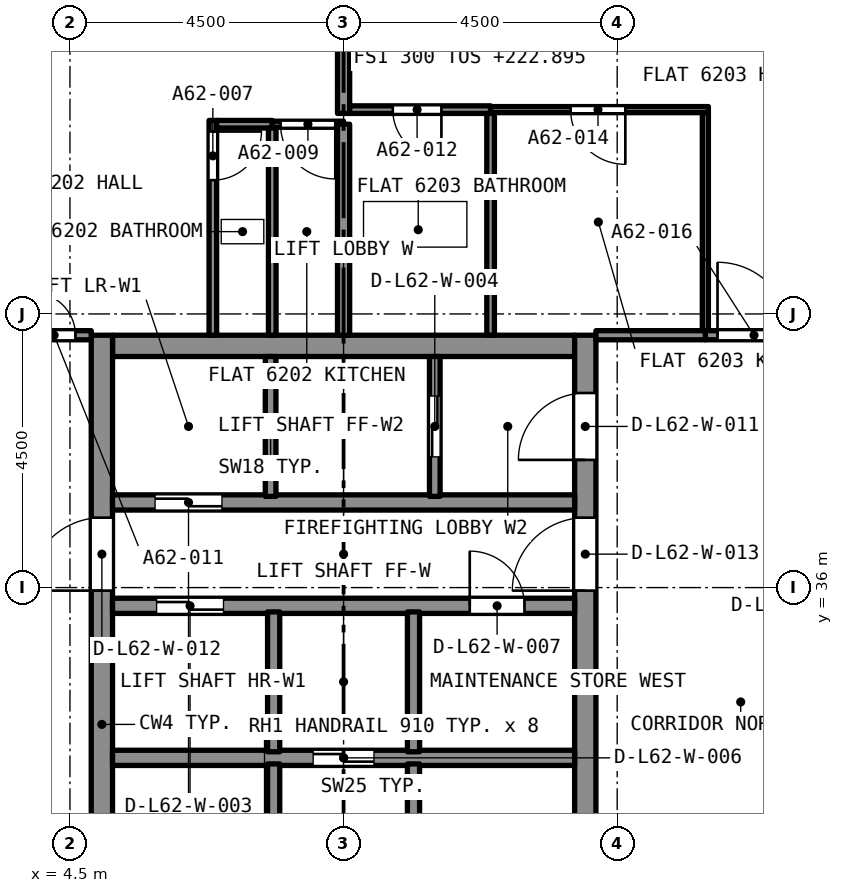
"""IFC4 building model, lengths in metres.
Left out: names, types, materials, properties, quantities, classifications, styles, units other than length and angle.
Written with IfcOpenShell. Run it as: python <this file> out.ifc"""

import sys

from ifc_helpers import new_model, si_unit, direction, frame, frame_2d, origin, place, context, subcontext, project, spatial, rectangle, extrude, element, fill, save


model = new_model("IFC4")
c1 = context("Model", 3, precision=1e-05, world=origin(), true_north=direction((0.0, 1.0)))
c2 = subcontext(c1, "Body", "Model", "MODEL_VIEW")
j1 = project(units=[si_unit("LENGTHUNIT", "METRE"), si_unit("PLANEANGLEUNIT", "RADIAN")], contexts=[c1])
p1 = place(None, origin())
s1 = spatial("IfcSite", under=j1, at=p1, CompositionType="ELEMENT")
p2 = place(p1, origin())
s2 = spatial("IfcBuilding", under=s1, at=p2, CompositionType="ELEMENT")
p3 = place(p2, frame((0.0, 0.0, 222.895)))
s3 = spatial("IfcBuildingStorey", under=s2, at=p3, CompositionType="ELEMENT", Elevation=222.895)
p4 = place(p3, frame((5.2, 39.975, 0.0), z_axis=(0.0, 0.0, 1.0), x_axis=(1.0, 0.0, 0.0)))
e1 = element("IfcWall", 1, at=p4, inside=s3, PredefinedType="SOLIDWALL", context=c2, shape_type="SweptSolid", body=[
    extrude(rectangle(XDim=7.6, YDim=0.35, at=frame_2d((3.8, 0.0))), origin(), (0.0, 0.0, 1.0), 3.2),
])
p5 = place(p3, frame((5.025, 27.35, 0.0), z_axis=(0.0, 0.0, 1.0), x_axis=(0.0, 1.0, 0.0)))
e2 = element("IfcWall", 2, at=p5, inside=s3, PredefinedType="SOLIDWALL", context=c2, shape_type="SweptSolid", body=[
    extrude(rectangle(XDim=12.8, YDim=0.35, at=frame_2d((6.4, 0.0))), origin(), (0.0, 0.0, 1.0), 3.2),
])
p6 = place(p5, frame((8.6, 0.0, 0.0)))
e3 = element("IfcOpeningElement", 3, at=p6, cuts=e2, PredefinedType="OPENING", context=c2, shape_type="SweptSolid", body=[
    extrude(rectangle(XDim=1.2, YDim=2.1, at=frame_2d((0.6, 1.05))), frame((0.0, 0.185, 0.0), z_axis=(0.0, -1.0, 0.0), x_axis=(1.0, 0.0, 0.0)), (0.0, 0.0, 1.0), 0.37),
])
p7 = place(p3, frame((12.975, 27.35, 0.0), z_axis=(0.0, 0.0, 1.0), x_axis=(0.0, 1.0, 0.0)))
e4 = element("IfcWall", 4, at=p7, inside=s3, PredefinedType="SOLIDWALL", context=c2, shape_type="SweptSolid", body=[
    extrude(rectangle(XDim=12.8, YDim=0.35, at=frame_2d((6.4, 0.0))), origin(), (0.0, 0.0, 1.0), 3.2),
])
p8 = place(p7, frame((10.75, 0.0, 0.0)))
e5 = element("IfcOpeningElement", 5, at=p8, cuts=e4, PredefinedType="OPENING", context=c2, shape_type="SweptSolid", body=[
    extrude(rectangle(XDim=1.1, YDim=2.1, at=frame_2d((0.55, 1.05))), frame((0.0, 0.185, 0.0), z_axis=(0.0, -1.0, 0.0), x_axis=(1.0, 0.0, 0.0)), (0.0, 0.0, 1.0), 0.37),
])
p9 = place(p7, frame((8.6, 0.0, 0.0)))
e6 = element("IfcOpeningElement", 6, at=p9, cuts=e4, PredefinedType="OPENING", context=c2, shape_type="SweptSolid", body=[
    extrude(rectangle(XDim=1.2, YDim=2.1, at=frame_2d((0.6, 1.05))), frame((0.0, 0.185, 0.0), z_axis=(0.0, -1.0, 0.0), x_axis=(1.0, 0.0, 0.0)), (0.0, 0.0, 1.0), 0.37),
])
p10 = place(p3, frame((6.85, 43.683, 0.0), z_axis=(0.0, 0.0, 1.0), x_axis=(0.0, -1.0, 0.0)))
e7 = element("IfcWall", 7, at=p10, inside=s3, PredefinedType="PARTITIONING", context=c2, shape_type="SweptSolid", body=[
    extrude(rectangle(XDim=3.533, YDim=0.125, at=frame_2d((1.766, 0.0))), origin(), (0.0, 0.0, 1.0), 2.9),
])
p11 = place(p10, frame((0.183, 0.0, 0.0)))
e8 = element("IfcOpeningElement", 8, at=p11, cuts=e7, PredefinedType="OPENING", context=c2, shape_type="SweptSolid", body=[
    extrude(rectangle(XDim=0.8, YDim=2.1, at=frame_2d((0.4, 1.05))), frame((0.0, 0.073, 0.0), z_axis=(0.0, -1.0, 0.0), x_axis=(1.0, 0.0, 0.0)), (0.0, 0.0, 1.0), 0.145),
])
p12 = place(p3, frame((6.913, 43.62, 0.0), z_axis=(0.0, 0.0, 1.0), x_axis=(1.0, 0.0, 0.0)))
e9 = element("IfcWall", 9, at=p12, inside=s3, PredefinedType="PARTITIONING", context=c2, shape_type="SweptSolid", body=[
    extrude(rectangle(XDim=0.915, YDim=0.125, at=frame_2d((0.458, 0.0))), origin(), (0.0, 0.0, 1.0), 2.9),
])
p13 = place(p3, frame((7.827, 40.15, 0.0), z_axis=(0.0, 0.0, 1.0), x_axis=(0.0, 1.0, 0.0)))
e10 = element("IfcWall", 10, at=p13, inside=s3, PredefinedType="PARTITIONING", context=c2, shape_type="SweptSolid", body=[
    extrude(rectangle(XDim=3.408, YDim=0.125, at=frame_2d((1.704, 0.0))), origin(), (0.0, 0.0, 1.0), 2.9),
])
p14 = place(p3, frame((9.0, 43.62, 0.0), z_axis=(0.0, 0.0, 1.0), x_axis=(-1.0, 0.0, 0.0)))
e11 = element("IfcWall", 11, at=p14, inside=s3, PredefinedType="PARTITIONING", context=c2, shape_type="SweptSolid", body=[
    extrude(rectangle(XDim=1.173, YDim=0.1, at=frame_2d((0.586, 0.0))), origin(), (0.0, 0.0, 1.0), 2.9),
])
p15 = place(p14, frame((0.136, 0.0, 0.0)))
e12 = element("IfcOpeningElement", 12, at=p15, cuts=e11, PredefinedType="OPENING", context=c2, shape_type="SweptSolid", body=[
    extrude(rectangle(XDim=0.9, YDim=2.1, at=frame_2d((0.45, 1.05))), frame((0.0, 0.06, 0.0), z_axis=(0.0, -1.0, 0.0), x_axis=(1.0, 0.0, 0.0)), (0.0, 0.0, 1.0), 0.12),
])
p16 = place(p3, frame((9.0, 43.798, 0.0), z_axis=(0.0, 0.0, 1.0), x_axis=(0.0, 1.0, 0.0)))
e13 = element("IfcWall", 13, at=p16, inside=s3, PredefinedType="PARTITIONING", context=c2, shape_type="SweptSolid", body=[
    extrude(rectangle(XDim=5.302, YDim=0.2, at=frame_2d((2.651, 0.0))), origin(), (0.0, 0.0, 1.0), 2.9),
])
p17 = place(p3, frame((3.65, 40.15, 0.0), z_axis=(0.0, 0.0, 1.0), x_axis=(1.0, 0.0, 0.0)))
e14 = element("IfcWall", 14, at=p17, inside=s3, PredefinedType="PARTITIONING", context=c2, shape_type="SweptSolid", body=[
    extrude(rectangle(XDim=1.2, YDim=0.15, at=frame_2d((0.6, 0.0))), origin(), (0.0, 0.0, 1.0), 2.9),
])
p18 = place(p17, frame((0.24, 0.0, 0.0)))
e15 = element("IfcOpeningElement", 15, at=p18, cuts=e14, PredefinedType="OPENING", context=c2, shape_type="SweptSolid", body=[
    extrude(rectangle(XDim=0.7, YDim=2.1, at=frame_2d((0.35, 1.05))), frame((0.0, 0.085, 0.0), z_axis=(0.0, -1.0, 0.0), x_axis=(1.0, 0.0, 0.0)), (0.0, 0.0, 1.0), 0.17),
])
p19 = place(p3, frame((9.0, 40.15, 0.0), z_axis=(0.0, 0.0, 1.0), x_axis=(0.0, 1.0, 0.0)))
e16 = element("IfcWall", 16, at=p19, inside=s3, PredefinedType="PARTITIONING", context=c2, shape_type="SweptSolid", body=[
    extrude(rectangle(XDim=3.47, YDim=0.2, at=frame_2d((1.735, 0.0))), origin(), (0.0, 0.0, 1.0), 2.9),
])
p20 = place(p3, frame((11.418, 43.86, 0.0), z_axis=(0.0, 0.0, 1.0), x_axis=(-1.0, 0.0, 0.0)))
e17 = element("IfcWall", 17, at=p20, inside=s3, PredefinedType="PARTITIONING", context=c2, shape_type="SweptSolid", body=[
    extrude(rectangle(XDim=2.318, YDim=0.125, at=frame_2d((1.159, 0.0))), origin(), (0.0, 0.0, 1.0), 2.9),
])
p21 = place(p20, frame((0.809, 0.0, 0.0)))
e18 = element("IfcOpeningElement", 18, at=p21, cuts=e17, PredefinedType="OPENING", context=c2, shape_type="SweptSolid", body=[
    extrude(rectangle(XDim=0.8, YDim=2.1, at=frame_2d((0.4, 1.05))), frame((0.0, 0.073, 0.0), z_axis=(0.0, -1.0, 0.0), x_axis=(1.0, 0.0, 0.0)), (0.0, 0.0, 1.0), 0.145),
])
p22 = place(p3, frame((11.418, 40.15, 0.0), z_axis=(0.0, 0.0, 1.0), x_axis=(0.0, 1.0, 0.0)))
e19 = element("IfcWall", 19, at=p22, inside=s3, PredefinedType="PARTITIONING", context=c2, shape_type="SweptSolid", body=[
    extrude(rectangle(XDim=3.648, YDim=0.125, at=frame_2d((1.824, 0.0))), origin(), (0.0, 0.0, 1.0), 2.9),
])
p23 = place(p3, frame((14.95, 40.225, 0.0), z_axis=(0.0, 0.0, 1.0), x_axis=(0.0, 1.0, 0.0)))
e20 = element("IfcWall", 20, at=p23, inside=s3, PredefinedType="PARTITIONING", context=c2, shape_type="SweptSolid", body=[
    extrude(rectangle(XDim=3.585, YDim=0.1, at=frame_2d((1.792, 0.0))), origin(), (0.0, 0.0, 1.0), 2.9),
])
p24 = place(p3, frame((15.0, 43.86, 0.0), z_axis=(0.0, 0.0, 1.0), x_axis=(-1.0, 0.0, 0.0)))
e21 = element("IfcWall", 21, at=p24, inside=s3, PredefinedType="PARTITIONING", context=c2, shape_type="SweptSolid", body=[
    extrude(rectangle(XDim=3.582, YDim=0.1, at=frame_2d((1.791, 0.0))), origin(), (0.0, 0.0, 1.0), 2.9),
])
p25 = place(p24, frame((1.366, 0.0, 0.0)))
e22 = element("IfcOpeningElement", 22, at=p25, cuts=e21, PredefinedType="OPENING", context=c2, shape_type="SweptSolid", body=[
    extrude(rectangle(XDim=0.9, YDim=2.1, at=frame_2d((0.45, 1.05))), frame((0.0, 0.06, 0.0), z_axis=(0.0, -1.0, 0.0), x_axis=(1.0, 0.0, 0.0)), (0.0, 0.0, 1.0), 0.12),
])
p26 = place(p3, frame((14.95, 40.15, 0.0), z_axis=(0.0, 0.0, 1.0), x_axis=(1.0, 0.0, 0.0)))
e23 = element("IfcWall", 23, at=p26, inside=s3, PredefinedType="PARTITIONING", context=c2, shape_type="SweptSolid", body=[
    extrude(rectangle(XDim=2.65, YDim=0.15, at=frame_2d((1.325, 0.0))), origin(), (0.0, 0.0, 1.0), 2.9),
])
p27 = place(p26, frame((0.2, 0.0, 0.0)))
e24 = element("IfcOpeningElement", 24, at=p27, cuts=e23, PredefinedType="OPENING", context=c2, shape_type="SweptSolid", body=[
    extrude(rectangle(XDim=1.2, YDim=2.4, at=frame_2d((0.6, 1.2))), frame((0.0, 0.085, 0.0), z_axis=(0.0, -1.0, 0.0), x_axis=(1.0, 0.0, 0.0)), (0.0, 0.0, 1.0), 0.17),
])
p28 = place(p3, frame((13.15, 40.15, 0.0), z_axis=(0.0, 0.0, 1.0), x_axis=(1.0, 0.0, 0.0)))
e25 = element("IfcWall", 25, at=p28, inside=s3, PredefinedType="PARTITIONING", context=c2, shape_type="SweptSolid", body=[
    extrude(rectangle(XDim=1.8, YDim=0.15, at=frame_2d((0.9, 0.0))), origin(), (0.0, 0.0, 1.0), 2.9),
])
p29 = place(p3, frame((5.2, 33.2, 0.0), z_axis=(0.0, 0.0, 1.0), x_axis=(1.0, 0.0, 0.0)))
e26 = element("IfcWall", 26, at=p29, inside=s3, PredefinedType="SOLIDWALL", context=c2, shape_type="SweptSolid", body=[
    extrude(rectangle(XDim=7.6, YDim=0.25, at=frame_2d((3.8, 0.0))), origin(), (0.0, 0.0, 1.0), 2.9),
])
p30 = place(p29, frame((3.3, 0.0, 0.0)))
e27 = element("IfcOpeningElement", 27, at=p30, cuts=e26, PredefinedType="OPENING", context=c2, shape_type="SweptSolid", body=[
    extrude(rectangle(XDim=1.0, YDim=2.1, at=frame_2d((0.5, 1.05))), frame((0.0, 0.135, 0.0), z_axis=(0.0, -1.0, 0.0), x_axis=(1.0, 0.0, 0.0)), (0.0, 0.0, 1.0), 0.27),
])
p31 = place(p3, frame((5.2, 35.7, 0.0), z_axis=(0.0, 0.0, 1.0), x_axis=(1.0, 0.0, 0.0)))
e28 = element("IfcWall", 28, at=p31, inside=s3, PredefinedType="SOLIDWALL", context=c2, shape_type="SweptSolid", body=[
    extrude(rectangle(XDim=7.6, YDim=0.25, at=frame_2d((3.8, 0.0))), origin(), (0.0, 0.0, 1.0), 2.9),
])
p32 = place(p31, frame((0.725, 0.0, 0.0)))
e29 = element("IfcOpeningElement", 29, at=p32, cuts=e28, PredefinedType="OPENING", context=c2, shape_type="SweptSolid", body=[
    extrude(rectangle(XDim=1.1, YDim=2.4, at=frame_2d((0.55, 1.2))), frame((0.0, 0.135, 0.0), z_axis=(0.0, -1.0, 0.0), x_axis=(1.0, 0.0, 0.0)), (0.0, 0.0, 1.0), 0.27),
])
p33 = place(p31, frame((5.875, 0.0, 0.0)))
e30 = element("IfcOpeningElement", 30, at=p33, cuts=e28, PredefinedType="OPENING", context=c2, shape_type="SweptSolid", body=[
    extrude(rectangle(XDim=0.9, YDim=2.1, at=frame_2d((0.45, 1.05))), frame((0.0, 0.135, 0.0), z_axis=(0.0, -1.0, 0.0), x_axis=(1.0, 0.0, 0.0)), (0.0, 0.0, 1.0), 0.27),
])
p34 = place(p3, frame((5.2, 37.4, 0.0), z_axis=(0.0, 0.0, 1.0), x_axis=(1.0, 0.0, 0.0)))
e31 = element("IfcWall", 31, at=p34, inside=s3, PredefinedType="SOLIDWALL", context=c2, shape_type="SweptSolid", body=[
    extrude(rectangle(XDim=7.6, YDim=0.25, at=frame_2d((3.8, 0.0))), origin(), (0.0, 0.0, 1.0), 2.9),
])
p35 = place(p34, frame((0.7, 0.0, 0.0)))
e32 = element("IfcOpeningElement", 32, at=p35, cuts=e31, PredefinedType="OPENING", context=c2, shape_type="SweptSolid", body=[
    extrude(rectangle(XDim=1.1, YDim=2.4, at=frame_2d((0.55, 1.2))), frame((0.0, 0.135, 0.0), z_axis=(0.0, -1.0, 0.0), x_axis=(1.0, 0.0, 0.0)), (0.0, 0.0, 1.0), 0.27),
])
p36 = place(p3, frame((7.85, 27.7, 0.0), z_axis=(0.0, 0.0, 1.0), x_axis=(0.0, 1.0, 0.0)))
e33 = element("IfcWall", 33, at=p36, inside=s3, PredefinedType="SOLIDWALL", context=c2, shape_type="SweptSolid", body=[
    extrude(rectangle(XDim=5.4, YDim=0.2, at=frame_2d((2.7, 0.0))), origin(), (0.0, 0.0, 1.0), 2.9),
])
p37 = place(p36, frame((0.2, 0.0, 0.0)))
e34 = element("IfcOpeningElement", 34, at=p37, cuts=e33, PredefinedType="OPENING", context=c2, shape_type="SweptSolid", body=[
    extrude(rectangle(XDim=0.9, YDim=2.1, at=frame_2d((0.45, 1.05))), frame((0.0, 0.11, 0.0), z_axis=(0.0, -1.0, 0.0), x_axis=(1.0, 0.0, 0.0)), (0.0, 0.0, 1.0), 0.22),
])
p38 = place(p3, frame((10.15, 27.7, 0.0), z_axis=(0.0, 0.0, 1.0), x_axis=(0.0, 1.0, 0.0)))
e35 = element("IfcWall", 35, at=p38, inside=s3, PredefinedType="SOLIDWALL", context=c2, shape_type="SweptSolid", body=[
    extrude(rectangle(XDim=5.4, YDim=0.2, at=frame_2d((2.7, 0.0))), origin(), (0.0, 0.0, 1.0), 2.9),
])
p39 = place(p38, frame((0.2, 0.0, 0.0)))
e36 = element("IfcOpeningElement", 36, at=p39, cuts=e35, PredefinedType="OPENING", context=c2, shape_type="SweptSolid", body=[
    extrude(rectangle(XDim=0.9, YDim=2.1, at=frame_2d((0.45, 1.05))), frame((0.0, 0.11, 0.0), z_axis=(0.0, -1.0, 0.0), x_axis=(1.0, 0.0, 0.0)), (0.0, 0.0, 1.0), 0.22),
])
for number, where, z_axis, x_axis in (
    (37, (7.85, 33.3, 0.0), (0.0, 0.0, 1.0), (0.0, 1.0, 0.0)),
    (38, (10.15, 33.3, 0.0), (0.0, 0.0, 1.0), (0.0, 1.0, 0.0)),
):
    element("IfcWall", number, at=place(p3, frame(where, z_axis=z_axis, x_axis=x_axis)), inside=s3, PredefinedType="SOLIDWALL", context=c2, shape_type="SweptSolid", body=[
        extrude(rectangle(XDim=2.3, YDim=0.2, at=frame_2d((1.15, 0.0))), origin(), (0.0, 0.0, 1.0), 2.9),
    ])
p40 = place(p3, frame((7.8, 37.5, 0.0), z_axis=(0.0, 0.0, 1.0), x_axis=(0.0, 1.0, 0.0)))
e39 = element("IfcWall", 39, at=p40, inside=s3, PredefinedType="SOLIDWALL", context=c2, shape_type="SweptSolid", body=[
    extrude(rectangle(XDim=2.3, YDim=0.175, at=frame_2d((1.15, 0.0))), origin(), (0.0, 0.0, 1.0), 2.9),
])
p41 = place(p3, frame((10.5, 37.5, 0.0), z_axis=(0.0, 0.0, 1.0), x_axis=(0.0, 1.0, 0.0)))
e40 = element("IfcWall", 40, at=p41, inside=s3, PredefinedType="SOLIDWALL", context=c2, shape_type="SweptSolid", body=[
    extrude(rectangle(XDim=2.3, YDim=0.175, at=frame_2d((1.15, 0.0))), origin(), (0.0, 0.0, 1.0), 2.9),
])
p42 = place(p41, frame((0.65, 0.0, 0.0)))
e41 = element("IfcOpeningElement", 41, at=p42, cuts=e40, PredefinedType="OPENING", context=c2, shape_type="SweptSolid", body=[
    extrude(rectangle(XDim=1.0, YDim=2.1, at=frame_2d((0.5, 1.05))), frame((0.0, 0.097, 0.0), z_axis=(0.0, -1.0, 0.0), x_axis=(1.0, 0.0, 0.0)), (0.0, 0.0, 1.0), 0.195),
])
p43 = place(p11, origin())
e42 = element("IfcDoor", 42, at=p43, inside=s3, OperationType="SINGLE_SWING_LEFT", PredefinedType="DOOR", context=c2, shape_type="SweptSolid", body=[
    extrude(rectangle(XDim=0.8, YDim=2.1, at=frame_2d((0.4, 1.05))), frame((0.0, 0.025, 0.0), z_axis=(0.0, -1.0, 0.0), x_axis=(1.0, 0.0, 0.0)), (0.0, 0.0, 1.0), 0.05),
])
fill(e8, e42)
p44 = place(p15, origin())
e43 = element("IfcDoor", 43, at=p44, inside=s3, OperationType="SINGLE_SWING_RIGHT", PredefinedType="DOOR", context=c2, shape_type="SweptSolid", body=[
    extrude(rectangle(XDim=0.9, YDim=2.1, at=frame_2d((0.45, 1.05))), frame((0.0, 0.025, 0.0), z_axis=(0.0, -1.0, 0.0), x_axis=(1.0, 0.0, 0.0)), (0.0, 0.0, 1.0), 0.05),
])
fill(e12, e43)
p45 = place(p18, origin())
e44 = element("IfcDoor", 44, at=p45, inside=s3, OperationType="SINGLE_SWING_LEFT", PredefinedType="DOOR", context=c2, shape_type="SweptSolid", body=[
    extrude(rectangle(XDim=0.7, YDim=2.1, at=frame_2d((0.35, 1.05))), frame((0.0, 0.025, 0.0), z_axis=(0.0, -1.0, 0.0), x_axis=(1.0, 0.0, 0.0)), (0.0, 0.0, 1.0), 0.05),
])
fill(e15, e44)
p46 = place(p21, origin())
e45 = element("IfcDoor", 45, at=p46, inside=s3, OperationType="SINGLE_SWING_RIGHT", PredefinedType="DOOR", context=c2, shape_type="SweptSolid", body=[
    extrude(rectangle(XDim=0.8, YDim=2.1, at=frame_2d((0.4, 1.05))), frame((0.0, 0.025, 0.0), z_axis=(0.0, -1.0, 0.0), x_axis=(1.0, 0.0, 0.0)), (0.0, 0.0, 1.0), 0.05),
])
fill(e18, e45)
p47 = place(p25, origin())
e46 = element("IfcDoor", 46, at=p47, inside=s3, OperationType="SINGLE_SWING_RIGHT", PredefinedType="DOOR", context=c2, shape_type="SweptSolid", body=[
    extrude(rectangle(XDim=0.9, YDim=2.1, at=frame_2d((0.45, 1.05))), frame((0.0, 0.025, 0.0), z_axis=(0.0, -1.0, 0.0), x_axis=(1.0, 0.0, 0.0)), (0.0, 0.0, 1.0), 0.05),
])
fill(e22, e46)
p48 = place(p27, origin())
e47 = element("IfcDoor", 47, at=p48, inside=s3, OperationType="SINGLE_SWING_LEFT", PredefinedType="DOOR", context=c2, shape_type="SweptSolid", body=[
    extrude(rectangle(XDim=1.2, YDim=2.4, at=frame_2d((0.6, 1.2))), frame((0.0, 0.025, 0.0), z_axis=(0.0, -1.0, 0.0), x_axis=(1.0, 0.0, 0.0)), (0.0, 0.0, 1.0), 0.05),
])
fill(e24, e47)
p49 = place(p35, origin())
e48 = element("IfcDoor", 48, at=p49, inside=s3, OperationType="SLIDING_TO_LEFT", PredefinedType="DOOR", context=c2, shape_type="SweptSolid", body=[
    extrude(rectangle(XDim=1.1, YDim=2.4, at=frame_2d((0.55, 1.2))), frame((0.0, 0.025, 0.0), z_axis=(0.0, -1.0, 0.0), x_axis=(1.0, 0.0, 0.0)), (0.0, 0.0, 1.0), 0.05),
])
fill(e32, e48)
p50 = place(p42, origin())
e49 = element("IfcDoor", 49, at=p50, inside=s3, OperationType="SLIDING_TO_LEFT", PredefinedType="DOOR", context=c2, shape_type="SweptSolid", body=[
    extrude(rectangle(XDim=1.0, YDim=2.1, at=frame_2d((0.5, 1.05))), frame((0.0, 0.025, 0.0), z_axis=(0.0, -1.0, 0.0), x_axis=(1.0, 0.0, 0.0)), (0.0, 0.0, 1.0), 0.05),
])
fill(e41, e49)
p51 = place(p32, origin())
e50 = element("IfcDoor", 50, at=p51, inside=s3, OperationType="SLIDING_TO_LEFT", PredefinedType="DOOR", context=c2, shape_type="SweptSolid", body=[
    extrude(rectangle(XDim=1.1, YDim=2.4, at=frame_2d((0.55, 1.2))), frame((0.0, 0.025, 0.0), z_axis=(0.0, -1.0, 0.0), x_axis=(1.0, 0.0, 0.0)), (0.0, 0.0, 1.0), 0.05),
])
fill(e29, e50)
p52 = place(p30, origin())
e51 = element("IfcDoor", 51, at=p52, inside=s3, OperationType="SLIDING_TO_LEFT", PredefinedType="DOOR", context=c2, shape_type="SweptSolid", body=[
    extrude(rectangle(XDim=1.0, YDim=2.1, at=frame_2d((0.5, 1.05))), frame((0.0, 0.025, 0.0), z_axis=(0.0, -1.0, 0.0), x_axis=(1.0, 0.0, 0.0)), (0.0, 0.0, 1.0), 0.05),
])
fill(e27, e51)
p53 = place(p33, origin())
e52 = element("IfcDoor", 52, at=p53, inside=s3, OperationType="SINGLE_SWING_LEFT", PredefinedType="DOOR", context=c2, shape_type="SweptSolid", body=[
    extrude(rectangle(XDim=0.9, YDim=2.1, at=frame_2d((0.45, 1.05))), frame((0.0, 0.025, 0.0), z_axis=(0.0, -1.0, 0.0), x_axis=(1.0, 0.0, 0.0)), (0.0, 0.0, 1.0), 0.05),
])
fill(e30, e52)
p54 = place(p8, origin())
e53 = element("IfcDoor", 53, at=p54, inside=s3, OperationType="SINGLE_SWING_LEFT", PredefinedType="DOOR", context=c2, shape_type="SweptSolid", body=[
    extrude(rectangle(XDim=1.1, YDim=2.1, at=frame_2d((0.55, 1.05))), frame((0.0, 0.025, 0.0), z_axis=(0.0, -1.0, 0.0), x_axis=(1.0, 0.0, 0.0)), (0.0, 0.0, 1.0), 0.05),
])
fill(e5, e53)
p55 = place(p6, origin())
e54 = element("IfcDoor", 54, at=p55, inside=s3, OperationType="SINGLE_SWING_LEFT", PredefinedType="DOOR", context=c2, shape_type="SweptSolid", body=[
    extrude(rectangle(XDim=1.2, YDim=2.1, at=frame_2d((0.6, 1.05))), frame((0.0, 0.025, 0.0), z_axis=(0.0, -1.0, 0.0), x_axis=(1.0, 0.0, 0.0)), (0.0, 0.0, 1.0), 0.05),
])
fill(e3, e54)
p56 = place(p9, origin())
e55 = element("IfcDoor", 55, at=p56, inside=s3, OperationType="SINGLE_SWING_LEFT", PredefinedType="DOOR", context=c2, shape_type="SweptSolid", body=[
    extrude(rectangle(XDim=1.2, YDim=2.1, at=frame_2d((0.6, 1.05))), frame((0.0, 0.025, 0.0), z_axis=(0.0, -1.0, 0.0), x_axis=(1.0, 0.0, 0.0)), (0.0, 0.0, 1.0), 0.05),
])
fill(e6, e55)
save(model, sys.argv[1])
